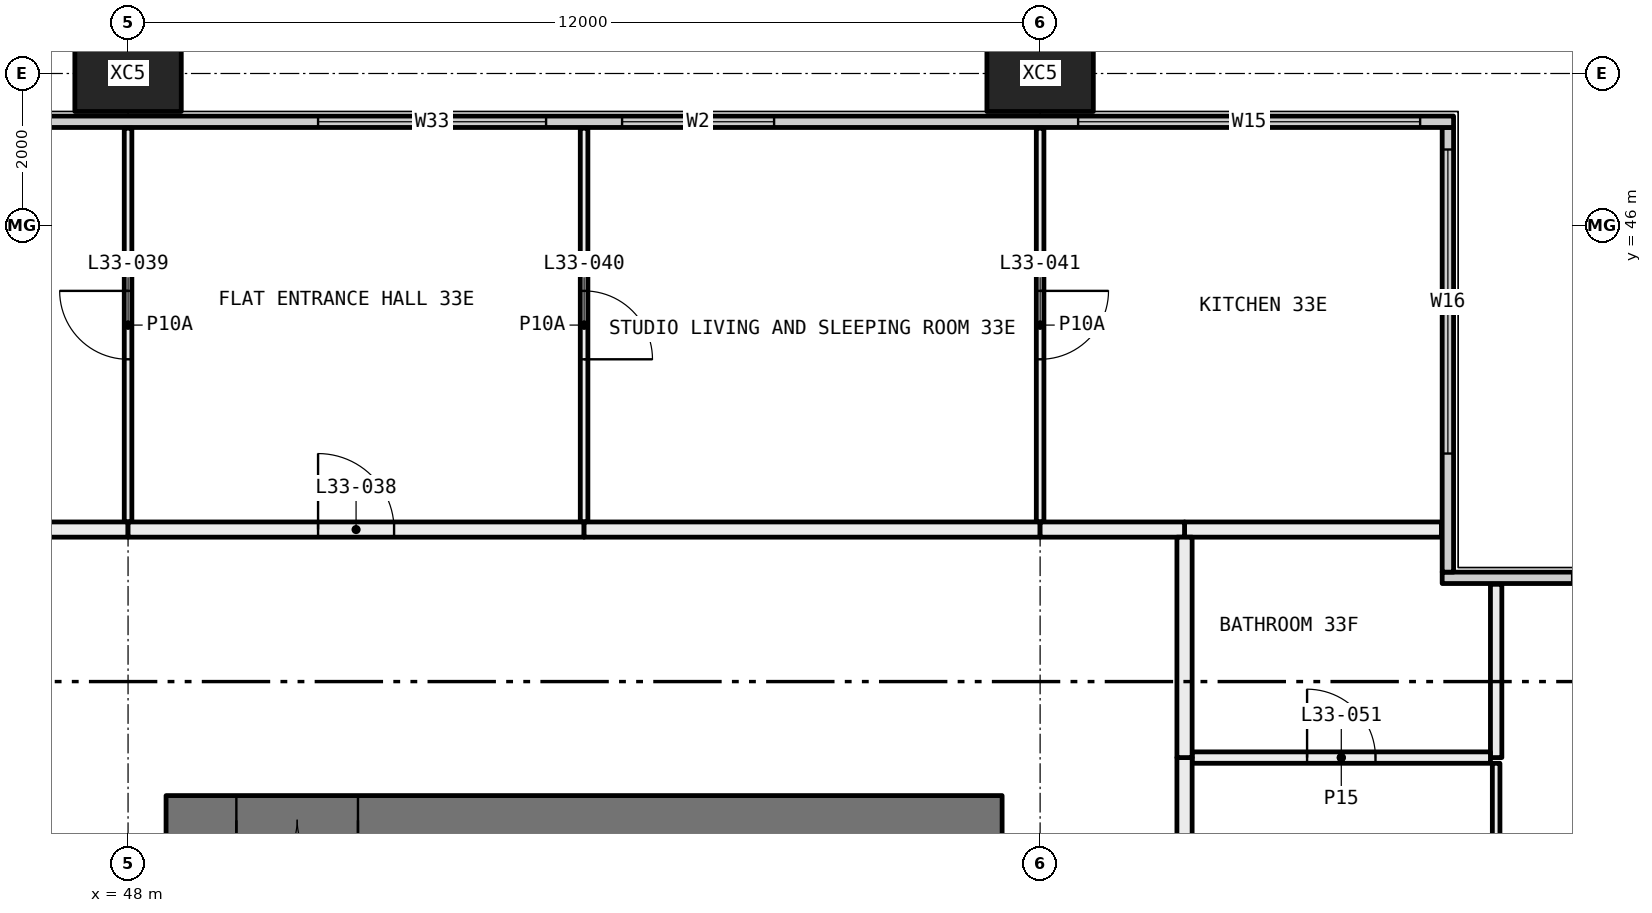
"""IFC4 building model, lengths in metres.
Left out: names, types, materials, properties, quantities, classifications, styles, units other than length and angle.
Written with IfcOpenShell. Run it as: python <this file> out.ifc"""

import sys

from ifc_helpers import new_model, si_unit, direction, frame, frame_2d, origin, origin_2d, place, context, subcontext, project, spatial, rectangle, hollow_rectangle, extrude, element, fill, save


model = new_model("IFC4")
c1 = context("Model", 3, precision=1e-05, world=origin(), true_north=direction((0.0, 1.0)))
c2 = subcontext(c1, "Body", "Model", "MODEL_VIEW")
j1 = project(units=[si_unit("LENGTHUNIT", "METRE"), si_unit("PLANEANGLEUNIT", "RADIAN")], contexts=[c1])
p1 = place(None, origin())
s1 = spatial("IfcSite", under=j1, at=p1, CompositionType="ELEMENT")
p2 = place(p1, origin())
s2 = spatial("IfcBuilding", under=s1, at=p2, CompositionType="ELEMENT")
p3 = place(p2, frame((0.0, 0.0, 127.65)))
s3 = spatial("IfcBuildingStorey", under=s2, at=p3, CompositionType="ELEMENT", Elevation=127.65)
for number, where, z_axis, x_axis in (
    (1, (48.0, 48.0, -0.4), (0.0, 0.0, 1.0), (1.0, 0.0, 0.0)),
    (2, (60.0, 48.0, -0.4), (0.0, 0.0, 1.0), (1.0, 0.0, 0.0)),
):
    element("IfcColumn", number, at=place(p3, frame(where, z_axis=z_axis, x_axis=x_axis)), inside=s3, PredefinedType="COLUMN", context=c2, shape_type="SweptSolid", body=[
        extrude(hollow_rectangle(XDim=1.4, YDim=1.0, WallThickness=0.055, at=origin_2d()), origin(), (0.0, 0.0, 1.0), 3.45),
    ])
p4 = place(p3, frame((65.29, 41.365, 0.0), z_axis=(0.0, 0.0, 1.0), x_axis=(1.0, 0.0, 0.0)))
e3 = element("IfcWall", 3, at=p4, inside=s3, PredefinedType="ELEMENTEDWALL", context=c2, shape_type="SweptSolid", body=[
    extrude(rectangle(XDim=6.15, YDim=0.15, at=frame_2d((3.075, 0.0))), origin(), (0.0, 0.0, 1.0), 3.05),
])
p5 = place(p4, frame((1.71, 0.0, 0.45)))
e4 = element("IfcOpeningElement", 4, at=p5, cuts=e3, PredefinedType="OPENING", context=c2, shape_type="SweptSolid", body=[
    extrude(rectangle(XDim=4.0, YDim=2.55, at=frame_2d((2.0, 1.275))), frame((0.0, 0.085, 0.0), z_axis=(0.0, -1.0, 0.0), x_axis=(1.0, 0.0, 0.0)), (0.0, 0.0, 1.0), 0.17),
])
p6 = place(p3, frame((65.365, 41.44, 0.0), z_axis=(0.0, 0.0, 1.0), x_axis=(0.0, 1.0, 0.0)))
e5 = element("IfcWall", 5, at=p6, inside=s3, PredefinedType="ELEMENTEDWALL", context=c2, shape_type="SweptSolid", body=[
    extrude(rectangle(XDim=5.85, YDim=0.15, at=frame_2d((2.925, 0.0))), origin(), (0.0, 0.0, 1.0), 3.05),
])
p7 = place(p6, frame((1.56, 0.0, 0.45)))
e6 = element("IfcOpeningElement", 6, at=p7, cuts=e5, PredefinedType="OPENING", context=c2, shape_type="SweptSolid", body=[
    extrude(rectangle(XDim=4.0, YDim=2.55, at=frame_2d((2.0, 1.275))), frame((0.0, 0.085, 0.0), z_axis=(0.0, -1.0, 0.0), x_axis=(1.0, 0.0, 0.0)), (0.0, 0.0, 1.0), 0.17),
])
p8 = place(p3, frame((6.56, 47.365, 0.0), z_axis=(0.0, 0.0, 1.0), x_axis=(1.0, 0.0, 0.0)))
e7 = element("IfcWall", 7, at=p8, inside=s3, PredefinedType="ELEMENTEDWALL", context=c2, shape_type="SweptSolid", body=[
    extrude(rectangle(XDim=58.88, YDim=0.15, at=frame_2d((29.44, 0.0))), origin(), (0.0, 0.0, 1.0), 3.05),
])
p9 = place(p8, frame((0.44, 0.0, 0.45)))
e8 = element("IfcOpeningElement", 8, at=p9, cuts=e7, PredefinedType="OPENING", context=c2, shape_type="SweptSolid", body=[
    extrude(rectangle(XDim=4.5, YDim=2.55, at=frame_2d((2.25, 1.275))), frame((0.0, 0.085, 0.0), z_axis=(0.0, -1.0, 0.0), x_axis=(1.0, 0.0, 0.0)), (0.0, 0.0, 1.0), 0.17),
])
p10 = place(p8, frame((7.94, 0.0, 0.45)))
e9 = element("IfcOpeningElement", 9, at=p10, cuts=e7, PredefinedType="OPENING", context=c2, shape_type="SweptSolid", body=[
    extrude(rectangle(XDim=3.0, YDim=2.55, at=frame_2d((1.5, 1.275))), frame((0.0, 0.085, 0.0), z_axis=(0.0, -1.0, 0.0), x_axis=(1.0, 0.0, 0.0)), (0.0, 0.0, 1.0), 0.17),
])
p11 = place(p8, frame((11.94, 0.0, 0.45)))
e10 = element("IfcOpeningElement", 10, at=p11, cuts=e7, PredefinedType="OPENING", context=c2, shape_type="SweptSolid", body=[
    extrude(rectangle(XDim=3.0, YDim=2.55, at=frame_2d((1.5, 1.275))), frame((0.0, 0.085, 0.0), z_axis=(0.0, -1.0, 0.0), x_axis=(1.0, 0.0, 0.0)), (0.0, 0.0, 1.0), 0.17),
])
p12 = place(p8, frame((19.94, 0.0, 0.45)))
e11 = element("IfcOpeningElement", 11, at=p12, cuts=e7, PredefinedType="OPENING", context=c2, shape_type="SweptSolid", body=[
    extrude(rectangle(XDim=3.0, YDim=2.55, at=frame_2d((1.5, 1.275))), frame((0.0, 0.085, 0.0), z_axis=(0.0, -1.0, 0.0), x_axis=(1.0, 0.0, 0.0)), (0.0, 0.0, 1.0), 0.17),
])
p13 = place(p8, frame((23.94, 0.0, 0.45)))
e12 = element("IfcOpeningElement", 12, at=p13, cuts=e7, PredefinedType="OPENING", context=c2, shape_type="SweptSolid", body=[
    extrude(rectangle(XDim=2.0, YDim=2.55, at=frame_2d((1.0, 1.275))), frame((0.0, 0.085, 0.0), z_axis=(0.0, -1.0, 0.0), x_axis=(1.0, 0.0, 0.0)), (0.0, 0.0, 1.0), 0.17),
])
p14 = place(p8, frame((31.94, 0.0, 0.45)))
e13 = element("IfcOpeningElement", 13, at=p14, cuts=e7, PredefinedType="OPENING", context=c2, shape_type="SweptSolid", body=[
    extrude(rectangle(XDim=3.0, YDim=2.55, at=frame_2d((1.5, 1.275))), frame((0.0, 0.085, 0.0), z_axis=(0.0, -1.0, 0.0), x_axis=(1.0, 0.0, 0.0)), (0.0, 0.0, 1.0), 0.17),
])
p15 = place(p8, frame((35.94, 0.0, 0.45)))
e14 = element("IfcOpeningElement", 14, at=p15, cuts=e7, PredefinedType="OPENING", context=c2, shape_type="SweptSolid", body=[
    extrude(rectangle(XDim=3.0, YDim=2.55, at=frame_2d((1.5, 1.275))), frame((0.0, 0.085, 0.0), z_axis=(0.0, -1.0, 0.0), x_axis=(1.0, 0.0, 0.0)), (0.0, 0.0, 1.0), 0.17),
])
p16 = place(p8, frame((43.94, 0.0, 0.45)))
e15 = element("IfcOpeningElement", 15, at=p16, cuts=e7, PredefinedType="OPENING", context=c2, shape_type="SweptSolid", body=[
    extrude(rectangle(XDim=3.0, YDim=2.55, at=frame_2d((1.5, 1.275))), frame((0.0, 0.085, 0.0), z_axis=(0.0, -1.0, 0.0), x_axis=(1.0, 0.0, 0.0)), (0.0, 0.0, 1.0), 0.17),
])
p17 = place(p8, frame((47.94, 0.0, 0.45)))
e16 = element("IfcOpeningElement", 16, at=p17, cuts=e7, PredefinedType="OPENING", context=c2, shape_type="SweptSolid", body=[
    extrude(rectangle(XDim=2.0, YDim=2.55, at=frame_2d((1.0, 1.275))), frame((0.0, 0.085, 0.0), z_axis=(0.0, -1.0, 0.0), x_axis=(1.0, 0.0, 0.0)), (0.0, 0.0, 1.0), 0.17),
])
p18 = place(p8, frame((53.94, 0.0, 0.45)))
e17 = element("IfcOpeningElement", 17, at=p18, cuts=e7, PredefinedType="OPENING", context=c2, shape_type="SweptSolid", body=[
    extrude(rectangle(XDim=4.5, YDim=2.55, at=frame_2d((2.25, 1.275))), frame((0.0, 0.085, 0.0), z_axis=(0.0, -1.0, 0.0), x_axis=(1.0, 0.0, 0.0)), (0.0, 0.0, 1.0), 0.17),
])
p19 = place(p3, frame((48.0, 42.1, 0.0), z_axis=(0.0, 0.0, 1.0), x_axis=(0.0, 1.0, 0.0)))
e18 = element("IfcWall", 18, at=p19, inside=s3, PredefinedType="PARTITIONING", context=c2, shape_type="SweptSolid", body=[
    extrude(rectangle(XDim=5.18, YDim=0.1, at=frame_2d((2.59, 0.0))), origin(), (0.0, 0.0, 1.0), 3.05),
])
p20 = place(p19, frame((2.14, 0.0, 0.0)))
e19 = element("IfcOpeningElement", 19, at=p20, cuts=e18, PredefinedType="OPENING", context=c2, shape_type="SweptSolid", body=[
    extrude(rectangle(XDim=0.9, YDim=2.1, at=frame_2d((0.45, 1.05))), frame((0.0, 0.06, 0.0), z_axis=(0.0, -1.0, 0.0), x_axis=(1.0, 0.0, 0.0)), (0.0, 0.0, 1.0), 0.12),
])
p21 = place(p3, frame((46.1, 42.0, 0.0), z_axis=(0.0, 0.0, 1.0), x_axis=(1.0, 0.0, 0.0)))
e20 = element("IfcWall", 20, at=p21, inside=s3, PredefinedType="PARTITIONING", context=c2, shape_type="SweptSolid", body=[
    extrude(rectangle(XDim=1.9, YDim=0.2, at=frame_2d((0.95, 0.0))), origin(), (0.0, 0.0, 1.0), 3.05),
])
p22 = place(p3, frame((54.0, 42.1, 0.0), z_axis=(0.0, 0.0, 1.0), x_axis=(0.0, 1.0, 0.0)))
e21 = element("IfcWall", 21, at=p22, inside=s3, PredefinedType="PARTITIONING", context=c2, shape_type="SweptSolid", body=[
    extrude(rectangle(XDim=5.18, YDim=0.1, at=frame_2d((2.59, 0.0))), origin(), (0.0, 0.0, 1.0), 3.05),
])
p23 = place(p22, frame((2.14, 0.0, 0.0)))
e22 = element("IfcOpeningElement", 22, at=p23, cuts=e21, PredefinedType="OPENING", context=c2, shape_type="SweptSolid", body=[
    extrude(rectangle(XDim=0.9, YDim=2.1, at=frame_2d((0.45, 1.05))), frame((0.0, 0.06, 0.0), z_axis=(0.0, -1.0, 0.0), x_axis=(1.0, 0.0, 0.0)), (0.0, 0.0, 1.0), 0.12),
])
p24 = place(p3, frame((48.0, 42.0, 0.0), z_axis=(0.0, 0.0, 1.0), x_axis=(1.0, 0.0, 0.0)))
e23 = element("IfcWall", 23, at=p24, inside=s3, PredefinedType="PARTITIONING", context=c2, shape_type="SweptSolid", body=[
    extrude(rectangle(XDim=6.0, YDim=0.2, at=frame_2d((3.0, 0.0))), origin(), (0.0, 0.0, 1.0), 3.05),
])
p25 = place(p24, frame((2.5, 0.0, 0.0)))
e24 = element("IfcOpeningElement", 24, at=p25, cuts=e23, PredefinedType="OPENING", context=c2, shape_type="SweptSolid", body=[
    extrude(rectangle(XDim=1.0, YDim=2.1, at=frame_2d((0.5, 1.05))), frame((0.0, 0.11, 0.0), z_axis=(0.0, -1.0, 0.0), x_axis=(1.0, 0.0, 0.0)), (0.0, 0.0, 1.0), 0.22),
])
p26 = place(p3, frame((60.0, 42.1, 0.0), z_axis=(0.0, 0.0, 1.0), x_axis=(0.0, 1.0, 0.0)))
e25 = element("IfcWall", 25, at=p26, inside=s3, PredefinedType="PARTITIONING", context=c2, shape_type="SweptSolid", body=[
    extrude(rectangle(XDim=5.18, YDim=0.1, at=frame_2d((2.59, 0.0))), origin(), (0.0, 0.0, 1.0), 3.05),
])
p27 = place(p26, frame((2.14, 0.0, 0.0)))
e26 = element("IfcOpeningElement", 26, at=p27, cuts=e25, PredefinedType="OPENING", context=c2, shape_type="SweptSolid", body=[
    extrude(rectangle(XDim=0.9, YDim=2.1, at=frame_2d((0.45, 1.05))), frame((0.0, 0.06, 0.0), z_axis=(0.0, -1.0, 0.0), x_axis=(1.0, 0.0, 0.0)), (0.0, 0.0, 1.0), 0.12),
])
p28 = place(p3, frame((54.0, 42.0, 0.0), z_axis=(0.0, 0.0, 1.0), x_axis=(1.0, 0.0, 0.0)))
e27 = element("IfcWall", 27, at=p28, inside=s3, PredefinedType="PARTITIONING", context=c2, shape_type="SweptSolid", body=[
    extrude(rectangle(XDim=6.0, YDim=0.2, at=frame_2d((3.0, 0.0))), origin(), (0.0, 0.0, 1.0), 3.05),
])
p29 = place(p3, frame((61.9, 42.0, 0.0), z_axis=(0.0, 0.0, 1.0), x_axis=(1.0, 0.0, 0.0)))
e28 = element("IfcWall", 28, at=p29, inside=s3, PredefinedType="PARTITIONING", context=c2, shape_type="SweptSolid", body=[
    extrude(rectangle(XDim=3.38, YDim=0.2, at=frame_2d((1.69, 0.0))), origin(), (0.0, 0.0, 1.0), 3.05),
])
p30 = place(p3, frame((60.0, 42.0, 0.0), z_axis=(0.0, 0.0, 1.0), x_axis=(1.0, 0.0, 0.0)))
e29 = element("IfcWall", 29, at=p30, inside=s3, PredefinedType="PARTITIONING", context=c2, shape_type="SweptSolid", body=[
    extrude(rectangle(XDim=1.9, YDim=0.2, at=frame_2d((0.95, 0.0))), origin(), (0.0, 0.0, 1.0), 3.05),
])
p31 = place(p3, frame((66.0, 38.925, 0.0), z_axis=(0.0, 0.0, 1.0), x_axis=(0.0, -1.0, 0.0)))
e30 = element("IfcWall", 30, at=p31, inside=s3, PredefinedType="PARTITIONING", context=c2, shape_type="SweptSolid", body=[
    extrude(rectangle(XDim=3.025, YDim=0.1, at=frame_2d((1.513, 0.0))), origin(), (0.0, 0.0, 1.0), 2.45),
])
p32 = place(p3, frame((66.0, 41.28, 0.0), z_axis=(0.0, 0.0, 1.0), x_axis=(0.0, -1.0, 0.0)))
e31 = element("IfcWall", 31, at=p32, inside=s3, PredefinedType="PARTITIONING", context=c2, shape_type="SweptSolid", body=[
    extrude(rectangle(XDim=2.28, YDim=0.15, at=frame_2d((1.14, 0.0))), origin(), (0.0, 0.0, 1.0), 3.05),
])
p33 = place(p3, frame((65.925, 39.0, 0.0), z_axis=(0.0, 0.0, 1.0), x_axis=(-1.0, 0.0, 0.0)))
e32 = element("IfcWall", 32, at=p33, inside=s3, PredefinedType="PARTITIONING", context=c2, shape_type="SweptSolid", body=[
    extrude(rectangle(XDim=3.925, YDim=0.15, at=frame_2d((1.962, 0.0))), origin(), (0.0, 0.0, 1.0), 3.05),
])
p34 = place(p33, frame((1.512, 0.0, 0.0)))
e33 = element("IfcOpeningElement", 33, at=p34, cuts=e32, PredefinedType="OPENING", context=c2, shape_type="SweptSolid", body=[
    extrude(rectangle(XDim=0.9, YDim=2.1, at=frame_2d((0.45, 1.05))), frame((0.0, 0.085, 0.0), z_axis=(0.0, -1.0, 0.0), x_axis=(1.0, 0.0, 0.0)), (0.0, 0.0, 1.0), 0.17),
])
p35 = place(p3, frame((61.9, 39.0, 0.0), z_axis=(0.0, 0.0, 1.0), x_axis=(0.0, -1.0, 0.0)))
e34 = element("IfcWall", 34, at=p35, inside=s3, PredefinedType="PARTITIONING", context=c2, shape_type="SweptSolid", body=[
    extrude(rectangle(XDim=3.1, YDim=0.2, at=frame_2d((1.55, 0.0))), origin(), (0.0, 0.0, 1.0), 2.45),
])
p36 = place(p3, frame((61.9, 41.9, 0.0), z_axis=(0.0, 0.0, 1.0), x_axis=(0.0, -1.0, 0.0)))
e35 = element("IfcWall", 35, at=p36, inside=s3, PredefinedType="PARTITIONING", context=c2, shape_type="SweptSolid", body=[
    extrude(rectangle(XDim=2.9, YDim=0.2, at=frame_2d((1.45, 0.0))), origin(), (0.0, 0.0, 1.0), 3.05),
])
p37 = place(p3, frame((59.5, 38.175, 0.0), z_axis=(0.0, 0.0, 1.0), x_axis=(-1.0, 0.0, 0.0)))
e36 = element("IfcWall", 36, at=p37, inside=s3, PredefinedType="SHEAR", context=c2, shape_type="SweptSolid", body=[
    extrude(rectangle(XDim=11.0, YDim=0.65, at=frame_2d((5.5, 0.0))), origin(), (0.0, 0.0, 1.0), 3.05),
])
p38 = place(p37, frame((8.475, 0.0, 0.0)))
e37 = element("IfcOpeningElement", 37, at=p38, cuts=e36, PredefinedType="OPENING", context=c2, shape_type="SweptSolid", body=[
    extrude(rectangle(XDim=1.6, YDim=2.1, at=frame_2d((0.8, 1.05))), frame((0.0, 0.335, 0.0), z_axis=(0.0, -1.0, 0.0), x_axis=(1.0, 0.0, 0.0)), (0.0, 0.0, 1.0), 0.67),
])
p39 = place(p7, origin())
e38 = element("IfcWindow", 38, at=p39, inside=s3, PartitioningType="SINGLE_PANEL", PredefinedType="WINDOW", context=c2, shape_type="SweptSolid", body=[
    extrude(rectangle(XDim=4.0, YDim=2.55, at=frame_2d((2.0, 1.275))), frame((0.0, 0.03, 0.0), z_axis=(0.0, -1.0, 0.0), x_axis=(1.0, 0.0, 0.0)), (0.0, 0.0, 1.0), 0.06),
])
fill(e6, e38)
p40 = place(p16, origin())
e39 = element("IfcWindow", 39, at=p40, inside=s3, PartitioningType="SINGLE_PANEL", PredefinedType="WINDOW", context=c2, shape_type="SweptSolid", body=[
    extrude(rectangle(XDim=3.0, YDim=2.55, at=frame_2d((1.5, 1.275))), frame((0.0, 0.03, 0.0), z_axis=(0.0, -1.0, 0.0), x_axis=(1.0, 0.0, 0.0)), (0.0, 0.0, 1.0), 0.06),
])
fill(e15, e39)
p41 = place(p17, origin())
e40 = element("IfcWindow", 40, at=p41, inside=s3, PartitioningType="SINGLE_PANEL", PredefinedType="WINDOW", context=c2, shape_type="SweptSolid", body=[
    extrude(rectangle(XDim=2.0, YDim=2.55, at=frame_2d((1.0, 1.275))), frame((0.0, 0.03, 0.0), z_axis=(0.0, -1.0, 0.0), x_axis=(1.0, 0.0, 0.0)), (0.0, 0.0, 1.0), 0.06),
])
fill(e16, e40)
p42 = place(p18, origin())
e41 = element("IfcWindow", 41, at=p42, inside=s3, PartitioningType="SINGLE_PANEL", PredefinedType="WINDOW", context=c2, shape_type="SweptSolid", body=[
    extrude(rectangle(XDim=4.5, YDim=2.55, at=frame_2d((2.25, 1.275))), frame((0.0, 0.03, 0.0), z_axis=(0.0, -1.0, 0.0), x_axis=(1.0, 0.0, 0.0)), (0.0, 0.0, 1.0), 0.06),
])
fill(e17, e41)
p43 = place(p25, origin())
e42 = element("IfcDoor", 42, at=p43, inside=s3, OperationType="SINGLE_SWING_RIGHT", PredefinedType="DOOR", context=c2, shape_type="SweptSolid", body=[
    extrude(rectangle(XDim=1.0, YDim=2.1, at=frame_2d((0.5, 1.05))), frame((0.0, 0.025, 0.0), z_axis=(0.0, -1.0, 0.0), x_axis=(1.0, 0.0, 0.0)), (0.0, 0.0, 1.0), 0.05),
])
fill(e24, e42)
p44 = place(p20, origin())
e43 = element("IfcDoor", 43, at=p44, inside=s3, OperationType="SINGLE_SWING_LEFT", PredefinedType="DOOR", context=c2, shape_type="SweptSolid", body=[
    extrude(rectangle(XDim=0.9, YDim=2.1, at=frame_2d((0.45, 1.05))), frame((0.0, 0.025, 0.0), z_axis=(0.0, -1.0, 0.0), x_axis=(1.0, 0.0, 0.0)), (0.0, 0.0, 1.0), 0.05),
])
fill(e19, e43)
p45 = place(p23, frame((0.9, 0.0, 0.0), x_axis=(-1.0, 0.0, 0.0)))
e44 = element("IfcDoor", 44, at=p45, inside=s3, OperationType="SINGLE_SWING_LEFT", PredefinedType="DOOR", context=c2, shape_type="SweptSolid", body=[
    extrude(rectangle(XDim=0.9, YDim=2.1, at=frame_2d((0.45, 1.05))), frame((0.0, 0.025, 0.0), z_axis=(0.0, -1.0, 0.0), x_axis=(1.0, 0.0, 0.0)), (0.0, 0.0, 1.0), 0.05),
])
fill(e22, e44)
p46 = place(p27, frame((0.9, 0.0, 0.0), x_axis=(-1.0, 0.0, 0.0)))
e45 = element("IfcDoor", 45, at=p46, inside=s3, OperationType="SINGLE_SWING_RIGHT", PredefinedType="DOOR", context=c2, shape_type="SweptSolid", body=[
    extrude(rectangle(XDim=0.9, YDim=2.1, at=frame_2d((0.45, 1.05))), frame((0.0, 0.025, 0.0), z_axis=(0.0, -1.0, 0.0), x_axis=(1.0, 0.0, 0.0)), (0.0, 0.0, 1.0), 0.05),
])
fill(e26, e45)
p47 = place(p34, frame((0.9, 0.0, 0.0), x_axis=(-1.0, 0.0, 0.0)))
e46 = element("IfcDoor", 46, at=p47, inside=s3, OperationType="SINGLE_SWING_RIGHT", PredefinedType="DOOR", context=c2, shape_type="SweptSolid", body=[
    extrude(rectangle(XDim=0.9, YDim=2.1, at=frame_2d((0.45, 1.05))), frame((0.0, 0.025, 0.0), z_axis=(0.0, -1.0, 0.0), x_axis=(1.0, 0.0, 0.0)), (0.0, 0.0, 1.0), 0.05),
])
fill(e33, e46)
p48 = place(p38, origin())
e47 = element("IfcDoor", 47, at=p48, inside=s3, OperationType="DOUBLE_DOOR_SINGLE_SWING", PredefinedType="DOOR", context=c2, shape_type="SweptSolid", body=[
    extrude(rectangle(XDim=1.6, YDim=2.1, at=frame_2d((0.8, 1.05))), frame((0.0, 0.025, 0.0), z_axis=(0.0, -1.0, 0.0), x_axis=(1.0, 0.0, 0.0)), (0.0, 0.0, 1.0), 0.05),
])
fill(e37, e47)
save(model, sys.argv[1])
